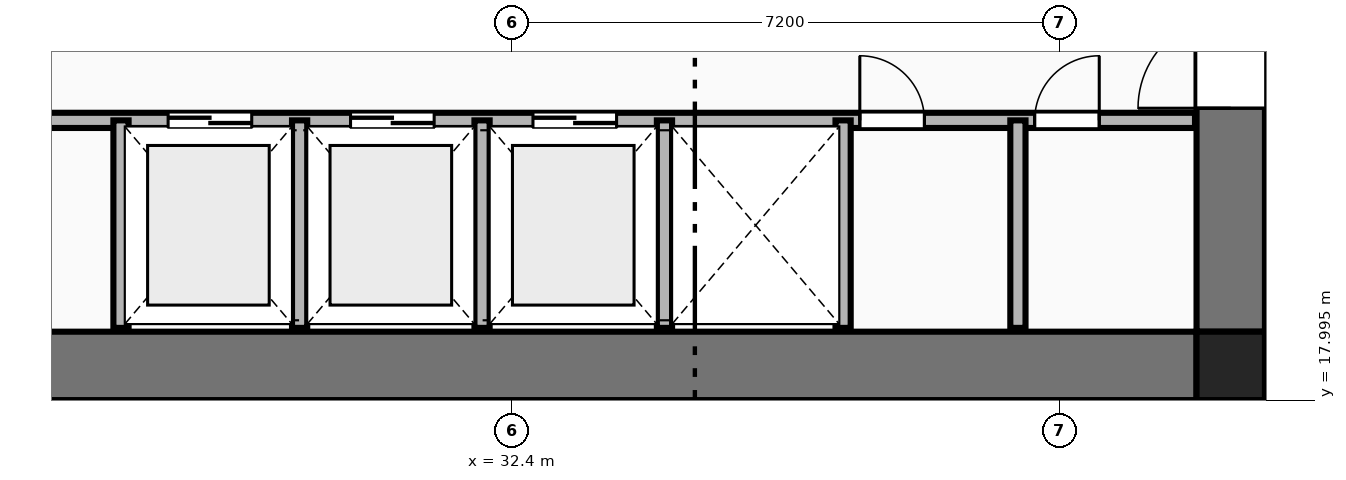
"""IFC4 building model, lengths in metres.
Left out: names, types, materials, properties, quantities, classifications, styles, units other than length and angle.
Written with IfcOpenShell. Run it as: python <this file> out.ifc"""

import sys

from ifc_helpers import new_model, si_unit, direction, frame, frame_2d, origin, origin_2d, place, context, subcontext, project, spatial, rectangle, extrude, element, fill, save


model = new_model("IFC4")
c1 = context("Model", 3, precision=1e-05, world=origin(), true_north=direction((0.0, 1.0)))
c2 = subcontext(c1, "Body", "Model", "MODEL_VIEW")
j1 = project(units=[si_unit("LENGTHUNIT", "METRE"), si_unit("PLANEANGLEUNIT", "RADIAN")], contexts=[c1])
p1 = place(None, origin())
s1 = spatial("IfcSite", under=j1, at=p1, CompositionType="ELEMENT")
p2 = place(p1, origin())
s2 = spatial("IfcBuilding", under=s1, at=p2, CompositionType="ELEMENT")
p3 = place(p2, frame((0.0, 0.0, 39.1)))
s3 = spatial("IfcBuildingStorey", under=s2, at=p3, CompositionType="ELEMENT", Elevation=39.1)
p4 = place(p3, frame((41.85, 18.45, 0.0), z_axis=(0.0, 0.0, 1.0), x_axis=(1.0, 0.0, 0.0)))
e1 = element("IfcColumn", 1, at=p4, inside=s3, PredefinedType="COLUMN", context=c2, shape_type="SweptSolid", body=[
    extrude(rectangle(XDim=0.9, YDim=0.9, at=origin_2d()), origin(), (0.0, 0.0, 1.0), 3.55),
])
p5 = place(p3, frame((23.4, 18.45, 0.0), z_axis=(0.0, 0.0, 1.0), x_axis=(1.0, 0.0, 0.0)))
e2 = element("IfcWall", 2, at=p5, inside=s3, PredefinedType="SHEAR", context=c2, shape_type="SweptSolid", body=[
    extrude(rectangle(XDim=18.0, YDim=0.9, at=frame_2d((9.0, 0.0))), origin(), (0.0, 0.0, 1.0), 3.33),
])
p6 = place(p3, frame((41.85, 18.9, 0.0), z_axis=(0.0, 0.0, 1.0), x_axis=(0.0, 1.0, 0.0)))
e3 = element("IfcWall", 3, at=p6, inside=s3, PredefinedType="SHEAR", context=c2, shape_type="SweptSolid", body=[
    extrude(rectangle(XDim=14.0, YDim=0.9, at=frame_2d((7.0, 0.0))), origin(), (0.0, 0.0, 1.0), 3.33),
])
p7 = place(p6, frame((2.94, 0.0, 0.0)))
e4 = element("IfcOpeningElement", 4, at=p7, cuts=e3, PredefinedType="OPENING", context=c2, shape_type="SweptSolid", body=[
    extrude(rectangle(XDim=1.22, YDim=2.25, at=frame_2d((0.61, 1.125))), frame((0.0, 0.46, 0.0), z_axis=(0.0, -1.0, 0.0), x_axis=(1.0, 0.0, 0.0)), (0.0, 0.0, 1.0), 0.92),
])
p8 = place(p3, frame((23.42, 21.68, 0.0), z_axis=(0.0, 0.0, 1.0), x_axis=(1.0, 0.0, 0.0)))
e5 = element("IfcWall", 5, at=p8, inside=s3, PredefinedType="PLUMBINGWALL", context=c2, shape_type="SweptSolid", body=[
    extrude(rectangle(XDim=17.96, YDim=0.2, at=frame_2d((8.98, 0.0))), origin(), (0.0, 0.0, 1.0), 3.33),
])
p9 = place(p8, frame((4.45, 0.0, 0.0)))
e6 = element("IfcOpeningElement", 6, at=p9, cuts=e5, PredefinedType="OPENING", context=c2, shape_type="SweptSolid", body=[
    extrude(rectangle(XDim=1.1, YDim=2.2, at=frame_2d((0.55, 1.1))), frame((0.0, 0.11, 0.0), z_axis=(0.0, -1.0, 0.0), x_axis=(1.0, 0.0, 0.0)), (0.0, 0.0, 1.0), 0.22),
])
p10 = place(p8, frame((6.85, 0.0, 0.0)))
e7 = element("IfcOpeningElement", 7, at=p10, cuts=e5, PredefinedType="OPENING", context=c2, shape_type="SweptSolid", body=[
    extrude(rectangle(XDim=1.1, YDim=2.2, at=frame_2d((0.55, 1.1))), frame((0.0, 0.11, 0.0), z_axis=(0.0, -1.0, 0.0), x_axis=(1.0, 0.0, 0.0)), (0.0, 0.0, 1.0), 0.22),
])
p11 = place(p8, frame((9.25, 0.0, 0.0)))
e8 = element("IfcOpeningElement", 8, at=p11, cuts=e5, PredefinedType="OPENING", context=c2, shape_type="SweptSolid", body=[
    extrude(rectangle(XDim=1.1, YDim=2.2, at=frame_2d((0.55, 1.1))), frame((0.0, 0.11, 0.0), z_axis=(0.0, -1.0, 0.0), x_axis=(1.0, 0.0, 0.0)), (0.0, 0.0, 1.0), 0.22),
])
p12 = place(p8, frame((1.2, 0.0, 0.0)))
e9 = element("IfcOpeningElement", 9, at=p12, cuts=e5, PredefinedType="OPENING", context=c2, shape_type="SweptSolid", body=[
    extrude(rectangle(XDim=0.85, YDim=2.05, at=frame_2d((0.425, 1.025))), frame((0.0, 0.11, 0.0), z_axis=(0.0, -1.0, 0.0), x_axis=(1.0, 0.0, 0.0)), (0.0, 0.0, 1.0), 0.22),
])
p13 = place(p8, frame((13.55, 0.0, 0.0)))
e10 = element("IfcOpeningElement", 10, at=p13, cuts=e5, PredefinedType="OPENING", context=c2, shape_type="SweptSolid", body=[
    extrude(rectangle(XDim=0.85, YDim=2.05, at=frame_2d((0.425, 1.025))), frame((0.0, 0.11, 0.0), z_axis=(0.0, -1.0, 0.0), x_axis=(1.0, 0.0, 0.0)), (0.0, 0.0, 1.0), 0.22),
])
p14 = place(p8, frame((15.85, 0.0, 0.0)))
e11 = element("IfcOpeningElement", 11, at=p14, cuts=e5, PredefinedType="OPENING", context=c2, shape_type="SweptSolid", body=[
    extrude(rectangle(XDim=0.85, YDim=2.05, at=frame_2d((0.425, 1.025))), frame((0.0, 0.11, 0.0), z_axis=(0.0, -1.0, 0.0), x_axis=(1.0, 0.0, 0.0)), (0.0, 0.0, 1.0), 0.22),
])
for number, where, z_axis, x_axis in (
    (12, (27.25, 18.95, 0.0), (0.0, 0.0, 1.0), (0.0, 1.0, 0.0)),
    (13, (29.6, 18.95, 0.0), (0.0, 0.0, 1.0), (0.0, 1.0, 0.0)),
    (14, (32.0, 18.95, 0.0), (0.0, 0.0, 1.0), (0.0, 1.0, 0.0)),
    (15, (34.4, 18.95, 0.0), (0.0, 0.0, 1.0), (0.0, 1.0, 0.0)),
    (16, (36.75, 18.95, 0.0), (0.0, 0.0, 1.0), (0.0, 1.0, 0.0)),
    (17, (39.05, 18.95, 0.0), (0.0, 0.0, 1.0), (0.0, 1.0, 0.0)),
):
    element("IfcWall", number, at=place(p3, frame(where, z_axis=z_axis, x_axis=x_axis)), inside=s3, PredefinedType="PLUMBINGWALL", context=c2, shape_type="SweptSolid", body=[
        extrude(rectangle(XDim=2.73, YDim=0.2, at=frame_2d((1.365, 0.0))), origin(), (0.0, 0.0, 1.0), 3.33),
    ])
p15 = place(p7, origin())
e18 = element("IfcDoor", 18, at=p15, inside=s3, OperationType="SINGLE_SWING_LEFT", PredefinedType="DOOR", context=c2, shape_type="SweptSolid", body=[
    extrude(rectangle(XDim=1.22, YDim=2.25, at=frame_2d((0.61, 1.125))), frame((0.0, 0.025, 0.0), z_axis=(0.0, -1.0, 0.0), x_axis=(1.0, 0.0, 0.0)), (0.0, 0.0, 1.0), 0.05),
])
fill(e4, e18)
p16 = place(p9, origin())
e19 = element("IfcDoor", 19, at=p16, inside=s3, OperationType="DOUBLE_DOOR_SLIDING", PredefinedType="DOOR", context=c2, shape_type="SweptSolid", body=[
    extrude(rectangle(XDim=1.1, YDim=2.2, at=frame_2d((0.55, 1.1))), frame((0.0, 0.025, 0.0), z_axis=(0.0, -1.0, 0.0), x_axis=(1.0, 0.0, 0.0)), (0.0, 0.0, 1.0), 0.05),
])
fill(e6, e19)
p17 = place(p10, origin())
e20 = element("IfcDoor", 20, at=p17, inside=s3, OperationType="DOUBLE_DOOR_SLIDING", PredefinedType="DOOR", context=c2, shape_type="SweptSolid", body=[
    extrude(rectangle(XDim=1.1, YDim=2.2, at=frame_2d((0.55, 1.1))), frame((0.0, 0.025, 0.0), z_axis=(0.0, -1.0, 0.0), x_axis=(1.0, 0.0, 0.0)), (0.0, 0.0, 1.0), 0.05),
])
fill(e7, e20)
p18 = place(p11, origin())
e21 = element("IfcDoor", 21, at=p18, inside=s3, OperationType="DOUBLE_DOOR_SLIDING", PredefinedType="DOOR", context=c2, shape_type="SweptSolid", body=[
    extrude(rectangle(XDim=1.1, YDim=2.2, at=frame_2d((0.55, 1.1))), frame((0.0, 0.025, 0.0), z_axis=(0.0, -1.0, 0.0), x_axis=(1.0, 0.0, 0.0)), (0.0, 0.0, 1.0), 0.05),
])
fill(e8, e21)
p19 = place(p13, origin())
e22 = element("IfcDoor", 22, at=p19, inside=s3, OperationType="SINGLE_SWING_LEFT", PredefinedType="DOOR", context=c2, shape_type="SweptSolid", body=[
    extrude(rectangle(XDim=0.85, YDim=2.05, at=frame_2d((0.425, 1.025))), frame((0.0, 0.025, 0.0), z_axis=(0.0, -1.0, 0.0), x_axis=(1.0, 0.0, 0.0)), (0.0, 0.0, 1.0), 0.05),
])
fill(e10, e22)
p20 = place(p14, origin())
e23 = element("IfcDoor", 23, at=p20, inside=s3, OperationType="SINGLE_SWING_RIGHT", PredefinedType="DOOR", context=c2, shape_type="SweptSolid", body=[
    extrude(rectangle(XDim=0.85, YDim=2.05, at=frame_2d((0.425, 1.025))), frame((0.0, 0.025, 0.0), z_axis=(0.0, -1.0, 0.0), x_axis=(1.0, 0.0, 0.0)), (0.0, 0.0, 1.0), 0.05),
])
fill(e11, e23)
save(model, sys.argv[1])
